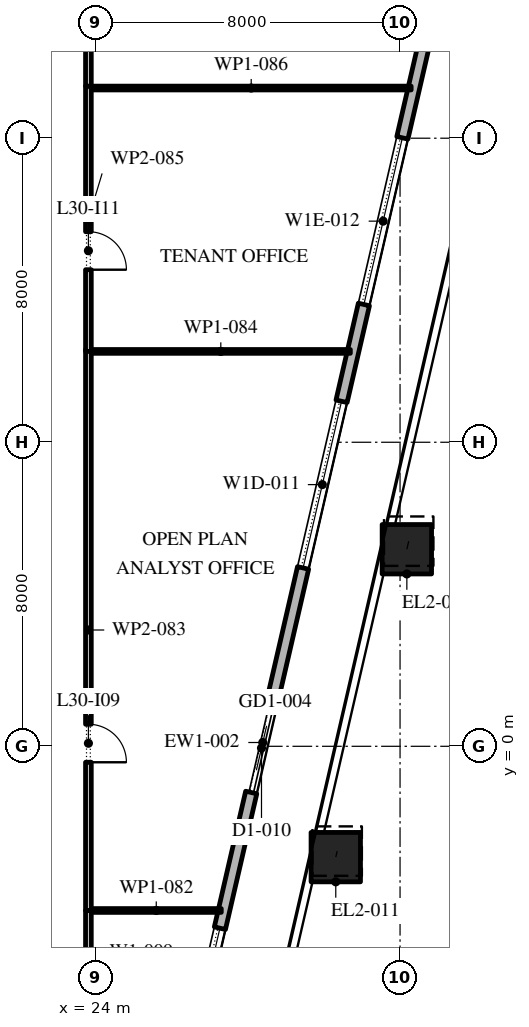
"""IFC4 building model, lengths in metres.
Left out: names, types, materials, properties, quantities, classifications, styles, units other than length and angle.
Written with IfcOpenShell. Run it as: python <this file> out.ifc"""

import sys

from ifc_helpers import new_model, si_unit, direction, frame, frame_2d, origin, origin_2d, place, context, subcontext, project, spatial, rectangle, extrude, element, fill, save


model = new_model("IFC4")
c1 = context("Model", 3, precision=1e-05, world=origin(), true_north=direction((0.0, 1.0)))
c2 = subcontext(c1, "Body", "Model", "MODEL_VIEW")
j1 = project(units=[si_unit("LENGTHUNIT", "METRE"), si_unit("PLANEANGLEUNIT", "RADIAN")], contexts=[c1])
p1 = place(None, origin())
s1 = spatial("IfcSite", under=j1, at=p1, CompositionType="ELEMENT")
p2 = place(p1, origin())
s2 = spatial("IfcBuilding", under=s1, at=p2, CompositionType="ELEMENT")
p3 = place(p2, frame((0.0, 0.0, 139.2)))
s3 = spatial("IfcBuildingStorey", under=s2, at=p3, CompositionType="ELEMENT", Elevation=139.2)
p4 = place(p3, frame((30.309, -2.917, 0.0), z_axis=(0.008770884695, 0.037929719907, 0.99924191662), x_axis=(-0.974290512438, 0.225295355862, 0.0)))
e1 = element("IfcColumn", 1, at=p4, inside=s3, PredefinedType="COLUMN", context=c2, shape_type="SweptSolid", body=[
    extrude(rectangle(XDim=1.3, YDim=1.3, at=origin_2d()), origin(), (0.0, 0.0, 1.0), 4.203),
])
p5 = place(p3, frame((32.179, 5.185, 0.0), z_axis=(0.011668267153, 0.050562490995, 0.998652735462), x_axis=(-0.974391195695, 0.224859506699, 0.0)))
e2 = element("IfcColumn", 2, at=p5, inside=s3, PredefinedType="COLUMN", context=c2, shape_type="SweptSolid", body=[
    extrude(rectangle(XDim=1.3, YDim=1.3, at=origin_2d()), origin(), (0.0, 0.0, 1.0), 4.206),
])
p6 = place(p3, frame((34.049, 13.286, 0.0), z_axis=(0.014559788571, 0.063169759976, 0.997896584813), x_axis=(-0.97445148511, 0.224598092528, 0.0)))
e3 = element("IfcColumn", 3, at=p6, inside=s3, PredefinedType="COLUMN", context=c2, shape_type="SweptSolid", body=[
    extrude(rectangle(XDim=1.3, YDim=1.3, at=origin_2d()), origin(), (0.0, 0.0, 1.0), 4.209),
])
p7 = place(p3, frame((22.82, -24.016, 0.0), z_axis=(0.0, 0.0, 1.0), x_axis=(0.224953880882, 0.974369412223, 0.0)))
e4 = element("IfcWall", 4, at=p7, inside=s3, PredefinedType="STANDARD", context=c2, shape_type="SweptSolid", body=[
    extrude(rectangle(XDim=49.5, YDim=0.3, at=frame_2d((24.75, 0.0))), origin(), (0.0, 0.0, 1.0), 4.0),
])
p8 = place(p7, frame((1.157, 0.0, 0.45)))
e5 = element("IfcOpeningElement", 5, at=p8, cuts=e4, PredefinedType="OPENING", context=c2, shape_type="SweptSolid", body=[
    extrude(rectangle(XDim=4.5, YDim=3.05, at=frame_2d((2.25, 1.525))), frame((0.0, 0.16, 0.0), z_axis=(0.0, -1.0, 0.0), x_axis=(1.0, 0.0, 0.0)), (0.0, 0.0, 1.0), 0.32),
])
p9 = place(p7, frame((8.121, 0.0, 0.45)))
e6 = element("IfcOpeningElement", 6, at=p9, cuts=e4, PredefinedType="OPENING", context=c2, shape_type="SweptSolid", body=[
    extrude(rectangle(XDim=4.5, YDim=3.05, at=frame_2d((2.25, 1.525))), frame((0.0, 0.16, 0.0), z_axis=(0.0, -1.0, 0.0), x_axis=(1.0, 0.0, 0.0)), (0.0, 0.0, 1.0), 0.32),
])
p10 = place(p7, frame((15.236, 0.0, 0.45)))
e7 = element("IfcOpeningElement", 7, at=p10, cuts=e4, PredefinedType="OPENING", context=c2, shape_type="SweptSolid", body=[
    extrude(rectangle(XDim=4.5, YDim=3.05, at=frame_2d((2.25, 1.525))), frame((0.0, 0.16, 0.0), z_axis=(0.0, -1.0, 0.0), x_axis=(1.0, 0.0, 0.0)), (0.0, 0.0, 1.0), 0.32),
])
p11 = place(p7, frame((23.4, 0.0, 0.0)))
e8 = element("IfcOpeningElement", 8, at=p11, cuts=e4, PredefinedType="OPENING", context=c2, shape_type="SweptSolid", body=[
    extrude(rectangle(XDim=2.4, YDim=3.5, at=frame_2d((1.2, 1.75))), frame((0.0, 0.16, 0.0), z_axis=(0.0, -1.0, 0.0), x_axis=(1.0, 0.0, 0.0)), (0.0, 0.0, 1.0), 0.32),
])
p12 = place(p7, frame((29.464, 0.0, 0.45)))
e9 = element("IfcOpeningElement", 9, at=p12, cuts=e4, PredefinedType="OPENING", context=c2, shape_type="SweptSolid", body=[
    extrude(rectangle(XDim=4.5, YDim=2.875, at=frame_2d((2.25, 1.438))), frame((0.0, 0.16, 0.0), z_axis=(0.0, -1.0, 0.0), x_axis=(1.0, 0.0, 0.0)), (0.0, 0.0, 1.0), 0.32),
])
p13 = place(p7, frame((36.579, 0.0, 0.45)))
e10 = element("IfcOpeningElement", 10, at=p13, cuts=e4, PredefinedType="OPENING", context=c2, shape_type="SweptSolid", body=[
    extrude(rectangle(XDim=4.5, YDim=2.825, at=frame_2d((2.25, 1.413))), frame((0.0, 0.16, 0.0), z_axis=(0.0, -1.0, 0.0), x_axis=(1.0, 0.0, 0.0)), (0.0, 0.0, 1.0), 0.32),
])
p14 = place(p7, frame((43.693, 0.0, 0.45)))
e11 = element("IfcOpeningElement", 11, at=p14, cuts=e4, PredefinedType="OPENING", context=c2, shape_type="SweptSolid", body=[
    extrude(rectangle(XDim=4.5, YDim=2.75, at=frame_2d((2.25, 1.375))), frame((0.0, 0.16, 0.0), z_axis=(0.0, -1.0, 0.0), x_axis=(1.0, 0.0, 0.0)), (0.0, 0.0, 1.0), 0.32),
])
p15 = place(p3, frame((23.8, -4.32, 0.0), z_axis=(0.0, 0.0, 1.0), x_axis=(0.0, -1.0, 0.0)))
e12 = element("IfcWall", 12, at=p15, inside=s3, PredefinedType="PARTITIONING", context=c2, shape_type="SweptSolid", body=[
    extrude(rectangle(XDim=3.105, YDim=0.15, at=frame_2d((1.552, 0.0))), origin(), (0.0, 0.0, 1.0), 4.0),
])
p16 = place(p15, frame((1.53, 0.0, 0.0)))
e13 = element("IfcOpeningElement", 13, at=p16, cuts=e12, PredefinedType="OPENING", context=c2, shape_type="SweptSolid", body=[
    extrude(rectangle(XDim=1.0, YDim=2.1, at=frame_2d((0.5, 1.05))), frame((0.0, 0.085, 0.0), z_axis=(0.0, -1.0, 0.0), x_axis=(1.0, 0.0, 0.0)), (0.0, 0.0, 1.0), 0.17),
])
p17 = place(p3, frame((23.875, -4.32, 0.0), z_axis=(0.0, 0.0, 1.0), x_axis=(1.0, 0.0, 0.0)))
e14 = element("IfcWall", 14, at=p17, inside=s3, PredefinedType="PARTITIONING", context=c2, shape_type="SweptSolid", body=[
    extrude(rectangle(XDim=3.421, YDim=0.1, at=frame_2d((1.71, 0.0))), origin(), (0.0, 0.0, 1.0), 4.0),
])
p18 = place(p3, frame((23.8, 10.44, 0.0), z_axis=(0.0, 0.0, 1.0), x_axis=(0.0, -1.0, 0.0)))
e15 = element("IfcWall", 15, at=p18, inside=s3, PredefinedType="PARTITIONING", context=c2, shape_type="SweptSolid", body=[
    extrude(rectangle(XDim=14.76, YDim=0.15, at=frame_2d((7.38, 0.0))), origin(), (0.0, 0.0, 1.0), 4.0),
])
p19 = place(p18, frame((9.86, 0.0, 0.0)))
e16 = element("IfcOpeningElement", 16, at=p19, cuts=e15, PredefinedType="OPENING", context=c2, shape_type="SweptSolid", body=[
    extrude(rectangle(XDim=1.0, YDim=2.1, at=frame_2d((0.5, 1.05))), frame((0.0, 0.085, 0.0), z_axis=(0.0, -1.0, 0.0), x_axis=(1.0, 0.0, 0.0)), (0.0, 0.0, 1.0), 0.17),
])
p20 = place(p3, frame((23.875, 10.39, 0.0), z_axis=(0.0, 0.0, 1.0), x_axis=(1.0, 0.0, 0.0)))
e17 = element("IfcWall", 17, at=p20, inside=s3, PredefinedType="PARTITIONING", context=c2, shape_type="SweptSolid", body=[
    extrude(rectangle(XDim=6.817, YDim=0.1, at=frame_2d((3.408, 0.0))), origin(), (0.0, 0.0, 1.0), 4.0),
])
p21 = place(p3, frame((23.8, 17.37, 0.0), z_axis=(0.0, 0.0, 1.0), x_axis=(0.0, -1.0, 0.0)))
e18 = element("IfcWall", 18, at=p21, inside=s3, PredefinedType="PARTITIONING", context=c2, shape_type="SweptSolid", body=[
    extrude(rectangle(XDim=6.98, YDim=0.15, at=frame_2d((3.49, 0.0))), origin(), (0.0, 0.0, 1.0), 4.0),
])
p22 = place(p21, frame((3.83, 0.0, 0.0)))
e19 = element("IfcOpeningElement", 19, at=p22, cuts=e18, PredefinedType="OPENING", context=c2, shape_type="SweptSolid", body=[
    extrude(rectangle(XDim=1.0, YDim=2.1, at=frame_2d((0.5, 1.05))), frame((0.0, 0.085, 0.0), z_axis=(0.0, -1.0, 0.0), x_axis=(1.0, 0.0, 0.0)), (0.0, 0.0, 1.0), 0.17),
])
p23 = place(p3, frame((23.875, 17.32, 0.0), z_axis=(0.0, 0.0, 1.0), x_axis=(1.0, 0.0, 0.0)))
e20 = element("IfcWall", 20, at=p23, inside=s3, PredefinedType="PARTITIONING", context=c2, shape_type="SweptSolid", body=[
    extrude(rectangle(XDim=8.417, YDim=0.1, at=frame_2d((4.208, 0.0))), origin(), (0.0, 0.0, 1.0), 4.0),
])
p24 = place(p3, frame((23.8, 23.46, 0.0), z_axis=(0.0, 0.0, 1.0), x_axis=(0.0, -1.0, 0.0)))
e21 = element("IfcWall", 21, at=p24, inside=s3, PredefinedType="PARTITIONING", context=c2, shape_type="SweptSolid", body=[
    extrude(rectangle(XDim=6.09, YDim=0.15, at=frame_2d((3.045, 0.0))), origin(), (0.0, 0.0, 1.0), 4.0),
])
p25 = place(p24, frame((1.99, 0.0, 0.0)))
e22 = element("IfcOpeningElement", 22, at=p25, cuts=e21, PredefinedType="OPENING", context=c2, shape_type="SweptSolid", body=[
    extrude(rectangle(XDim=1.0, YDim=2.1, at=frame_2d((0.5, 1.05))), frame((0.0, 0.085, 0.0), z_axis=(0.0, -1.0, 0.0), x_axis=(1.0, 0.0, 0.0)), (0.0, 0.0, 1.0), 0.17),
])
p26 = place(p10, origin())
e23 = element("IfcWindow", 23, at=p26, inside=s3, PartitioningType="DOUBLE_PANEL_VERTICAL", PredefinedType="WINDOW", context=c2, shape_type="SweptSolid", body=[
    extrude(rectangle(XDim=4.5, YDim=3.05, at=frame_2d((2.25, 1.525))), frame((0.0, 0.03, 0.0), z_axis=(0.0, -1.0, 0.0), x_axis=(1.0, 0.0, 0.0)), (0.0, 0.0, 1.0), 0.06),
])
fill(e7, e23)
p27 = place(p11, origin())
e24 = element("IfcDoor", 24, at=p27, inside=s3, OperationType="DOUBLE_DOOR_SLIDING", PredefinedType="DOOR", context=c2, shape_type="SweptSolid", body=[
    extrude(rectangle(XDim=2.4, YDim=3.5, at=frame_2d((1.2, 1.75))), frame((0.0, 0.025, 0.0), z_axis=(0.0, -1.0, 0.0), x_axis=(1.0, 0.0, 0.0)), (0.0, 0.0, 1.0), 0.05),
])
fill(e8, e24)
p28 = place(p12, origin())
e25 = element("IfcWindow", 25, at=p28, inside=s3, PartitioningType="DOUBLE_PANEL_VERTICAL", PredefinedType="WINDOW", context=c2, shape_type="SweptSolid", body=[
    extrude(rectangle(XDim=4.5, YDim=2.875, at=frame_2d((2.25, 1.438))), frame((0.0, 0.03, 0.0), z_axis=(0.0, -1.0, 0.0), x_axis=(1.0, 0.0, 0.0)), (0.0, 0.0, 1.0), 0.06),
])
fill(e9, e25)
p29 = place(p13, origin())
e26 = element("IfcWindow", 26, at=p29, inside=s3, PartitioningType="DOUBLE_PANEL_VERTICAL", PredefinedType="WINDOW", context=c2, shape_type="SweptSolid", body=[
    extrude(rectangle(XDim=4.5, YDim=2.825, at=frame_2d((2.25, 1.413))), frame((0.0, 0.03, 0.0), z_axis=(0.0, -1.0, 0.0), x_axis=(1.0, 0.0, 0.0)), (0.0, 0.0, 1.0), 0.06),
])
fill(e10, e26)
p30 = place(p19, origin())
e27 = element("IfcDoor", 27, at=p30, inside=s3, OperationType="SINGLE_SWING_LEFT", PredefinedType="DOOR", context=c2, shape_type="SweptSolid", body=[
    extrude(rectangle(XDim=1.0, YDim=2.1, at=frame_2d((0.5, 1.05))), frame((0.0, 0.025, 0.0), z_axis=(0.0, -1.0, 0.0), x_axis=(1.0, 0.0, 0.0)), (0.0, 0.0, 1.0), 0.05),
])
fill(e16, e27)
p31 = place(p22, origin())
e28 = element("IfcDoor", 28, at=p31, inside=s3, OperationType="SINGLE_SWING_LEFT", PredefinedType="DOOR", context=c2, shape_type="SweptSolid", body=[
    extrude(rectangle(XDim=1.0, YDim=2.1, at=frame_2d((0.5, 1.05))), frame((0.0, 0.025, 0.0), z_axis=(0.0, -1.0, 0.0), x_axis=(1.0, 0.0, 0.0)), (0.0, 0.0, 1.0), 0.05),
])
fill(e19, e28)
save(model, sys.argv[1])
